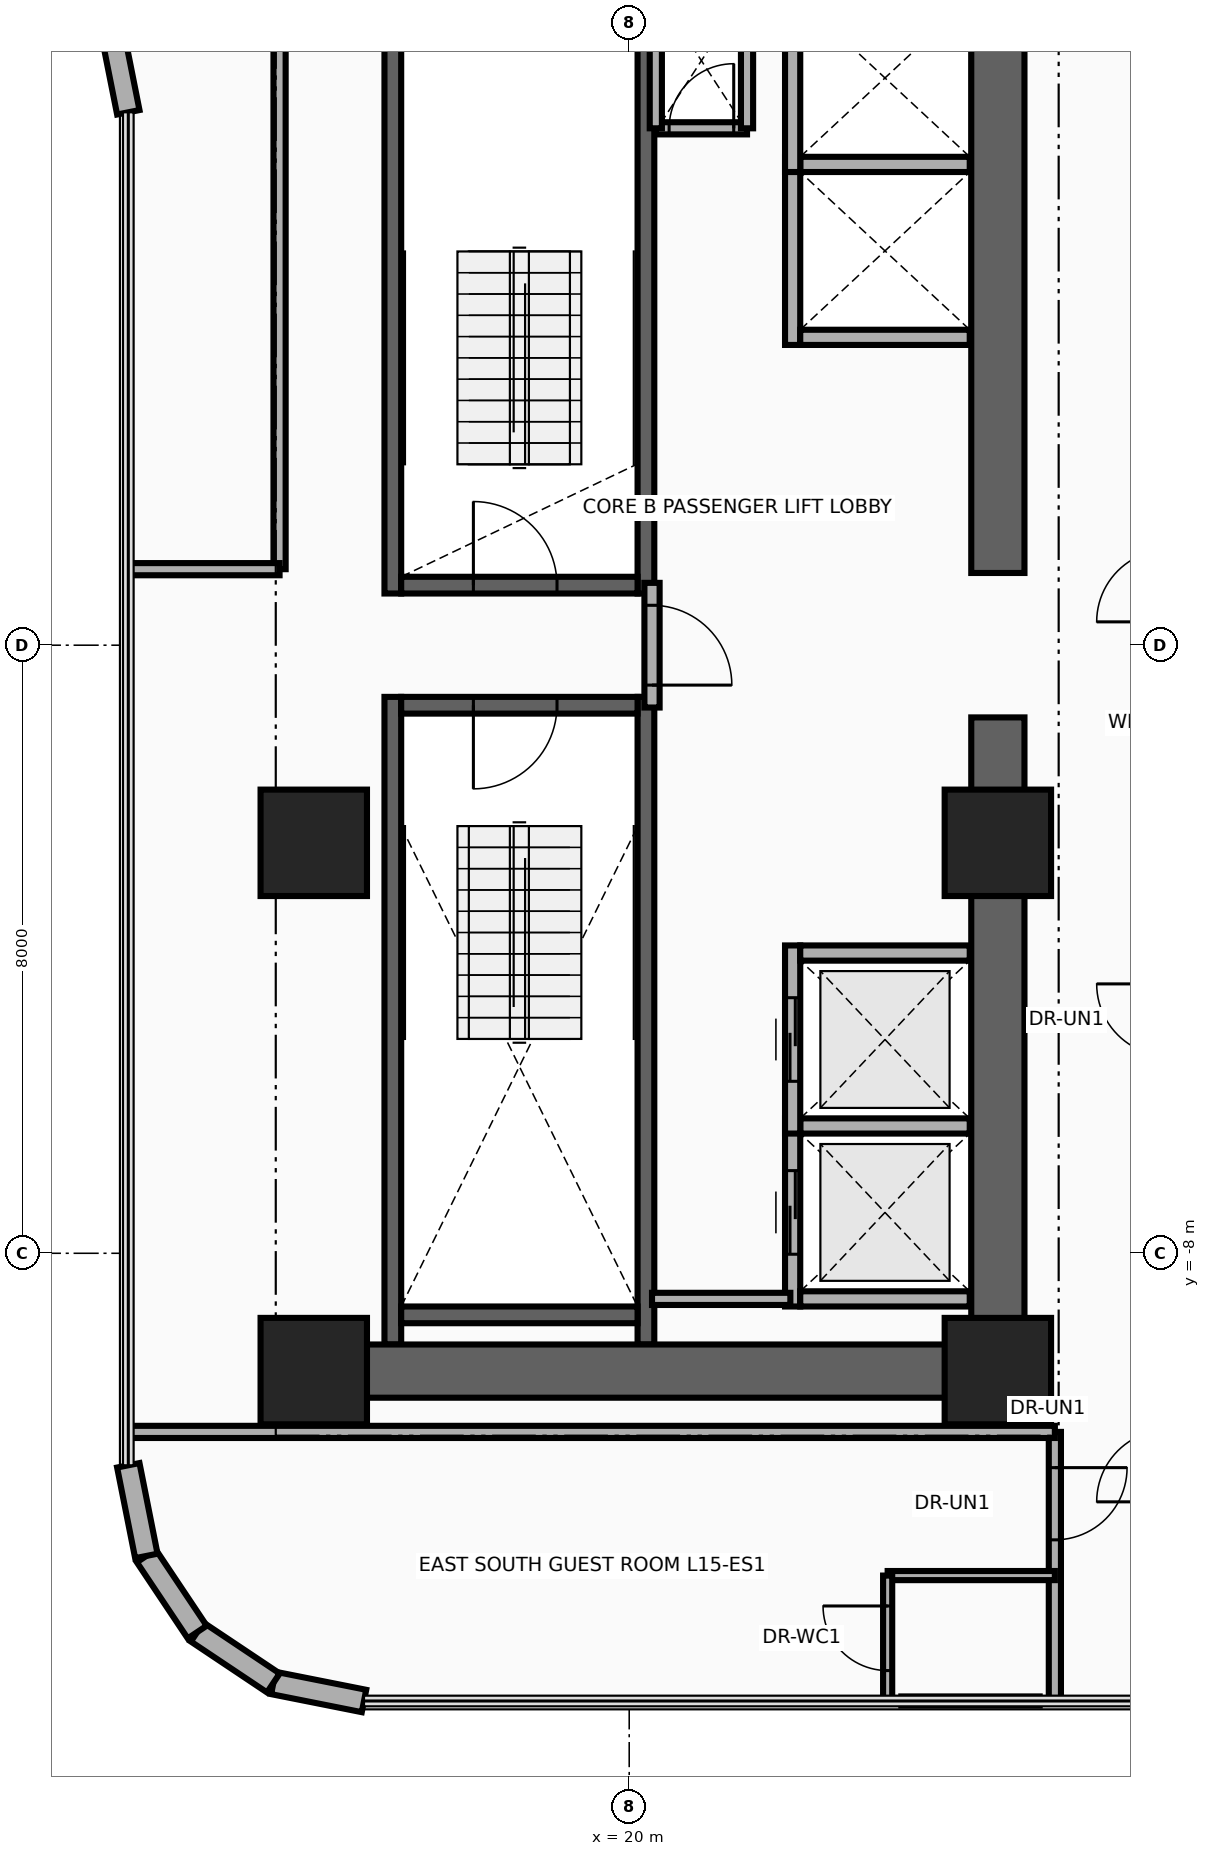
"""IFC4 building model, lengths in metres.
Left out: names, types, materials, properties, quantities, classifications, styles, units other than length and angle.
Written with IfcOpenShell. Run it as: python <this file> out.ifc"""

import sys

from ifc_helpers import new_model, si_unit, direction, frame, frame_2d, origin, origin_2d, place, context, subcontext, project, spatial, rectangle, extrude, source, transform, mapped, element, fill, save


model = new_model("IFC4")
c1 = context("Model", 3, precision=1e-05, world=origin(), true_north=direction((0.0, 1.0)))
c2 = subcontext(c1, "Body", "Model", "MODEL_VIEW")
j1 = project(units=[si_unit("LENGTHUNIT", "METRE"), si_unit("PLANEANGLEUNIT", "RADIAN")], contexts=[c1])
p1 = place(None, origin())
s1 = spatial("IfcSite", under=j1, at=p1, CompositionType="ELEMENT")
p2 = place(p1, origin())
s2 = spatial("IfcBuilding", under=s1, at=p2, CompositionType="ELEMENT")
p3 = place(p2, frame((0.0, 0.0, 63.0)))
s3 = spatial("IfcBuildingStorey", under=s2, at=p3, CompositionType="ELEMENT", Elevation=63.0)
for number, where, z_axis, x_axis in (
    (1, (16.89, 0.68, 0.0), (0.0, 0.0, 1.0), (0.0, 1.0, 0.0)),
    (2, (20.22, 0.68, 0.0), (0.0, 0.0, 1.0), (0.0, 1.0, 0.0)),
):
    element("IfcWall", number, at=place(p3, frame(where, z_axis=z_axis, x_axis=x_axis)), inside=s3, PredefinedType="SHEAR", context=c2, shape_type="SweptSolid", body=[
        extrude(rectangle(XDim=8.52, YDim=0.22, at=frame_2d((4.26, 0.0))), origin(), (0.0, 0.0, 1.0), 3.46),
    ])
p4 = place(p3, frame((17.0, 0.79, 0.0), z_axis=(0.0, 0.0, 1.0), x_axis=(1.0, 0.0, 0.0)))
e3 = element("IfcWall", 3, at=p4, inside=s3, PredefinedType="SHEAR", context=c2, shape_type="SweptSolid", body=[
    extrude(rectangle(XDim=3.11, YDim=0.22, at=frame_2d((1.555, 0.0))), origin(), (0.0, 0.0, 1.0), 3.46),
])
p5 = place(p4, frame((0.95, 0.0, 0.0)))
e4 = element("IfcOpeningElement", 4, at=p5, cuts=e3, PredefinedType="OPENING", context=c2, shape_type="SweptSolid", body=[
    extrude(rectangle(XDim=1.1, YDim=2.15, at=frame_2d((0.55, 1.075))), frame((0.0, 0.125, 0.0), z_axis=(0.0, -1.0, 0.0), x_axis=(1.0, 0.0, 0.0)), (0.0, 0.0, 1.0), 0.25),
])
for number, where, z_axis, x_axis in (
    (5, (16.89, -9.2, 0.0), (0.0, 0.0, 1.0), (0.0, 1.0, 0.0)),
    (6, (20.22, -9.2, 0.0), (0.0, 0.0, 1.0), (0.0, 1.0, 0.0)),
):
    element("IfcWall", number, at=place(p3, frame(where, z_axis=z_axis, x_axis=x_axis)), inside=s3, PredefinedType="SHEAR", context=c2, shape_type="SweptSolid", body=[
        extrude(rectangle(XDim=8.52, YDim=0.22, at=frame_2d((4.26, 0.0))), origin(), (0.0, 0.0, 1.0), 3.46),
    ])
p6 = place(p3, frame((17.0, -8.81, 0.0), z_axis=(0.0, 0.0, 1.0), x_axis=(1.0, 0.0, 0.0)))
e7 = element("IfcWall", 7, at=p6, inside=s3, PredefinedType="SHEAR", context=c2, shape_type="SweptSolid", body=[
    extrude(rectangle(XDim=3.11, YDim=0.22, at=frame_2d((1.555, 0.0))), origin(), (0.0, 0.0, 1.0), 3.46),
])
p7 = place(p3, frame((17.0, -0.79, 0.0), z_axis=(0.0, 0.0, 1.0), x_axis=(1.0, 0.0, 0.0)))
e8 = element("IfcWall", 8, at=p7, inside=s3, PredefinedType="SHEAR", context=c2, shape_type="SweptSolid", body=[
    extrude(rectangle(XDim=3.11, YDim=0.22, at=frame_2d((1.555, 0.0))), origin(), (0.0, 0.0, 1.0), 3.46),
])
p8 = place(p7, frame((0.95, 0.0, 0.0)))
e9 = element("IfcOpeningElement", 9, at=p8, cuts=e8, PredefinedType="OPENING", context=c2, shape_type="SweptSolid", body=[
    extrude(rectangle(XDim=1.1, YDim=2.15, at=frame_2d((0.55, 1.075))), frame((0.0, 0.125, 0.0), z_axis=(0.0, -1.0, 0.0), x_axis=(1.0, 0.0, 0.0)), (0.0, 0.0, 1.0), 0.25),
])
for number, where, z_axis, x_axis in (
    (10, (24.85, -9.9, 0.0), (0.0, 0.0, 1.0), (0.0, 1.0, 0.0)),
    (11, (24.85, 0.95, 0.0), (0.0, 0.0, 1.0), (0.0, 1.0, 0.0)),
):
    element("IfcWall", number, at=place(p3, frame(where, z_axis=z_axis, x_axis=x_axis)), inside=s3, PredefinedType="SHEAR", context=c2, shape_type="SweptSolid", body=[
        extrude(rectangle(XDim=8.95, YDim=0.7, at=frame_2d((4.475, 0.0))), origin(), (0.0, 0.0, 1.0), 3.46),
    ])
p9 = place(p3, frame((15.85, -9.55, 0.0), z_axis=(0.0, 0.0, 1.0), x_axis=(1.0, 0.0, 0.0)))
e12 = element("IfcWall", 12, at=p9, inside=s3, PredefinedType="SHEAR", context=c2, shape_type="SweptSolid", body=[
    extrude(rectangle(XDim=9.0, YDim=0.7, at=frame_2d((4.5, 0.0))), origin(), (0.0, 0.0, 1.0), 3.46),
])
m1 = source(origin(), c2, "Body", "SweptSolid", [
    extrude(rectangle(XDim=1.4, YDim=1.4, at=origin_2d()), origin(), (0.0, 0.0, 1.0), 3.7),
])
for number, where, z_axis, x_axis in (
    (13, (15.85, -9.55, 0.0), (0.0, 0.0, 1.0), (1.0, 0.0, 0.0)),
    (14, (24.85, -9.55, 0.0), (0.0, 0.0, 1.0), (1.0, 0.0, 0.0)),
    (15, (15.85, -2.6, 0.0), (0.0, 0.0, 1.0), (1.0, 0.0, 0.0)),
    (16, (24.85, -2.6, 0.0), (0.0, 0.0, 1.0), (1.0, 0.0, 0.0)),
):
    element("IfcColumn", number, at=place(p3, frame(where, z_axis=z_axis, x_axis=x_axis)), inside=s3, PredefinedType="COLUMN", context=c2, shape_type="MappedRepresentation", body=[
        mapped(m1, transform((0.0, 0.0, 0.0), x_axis=(1.0, 0.0, 0.0), y_axis=(0.0, 1.0, 0.0), z_axis=(0.0, 0.0, 1.0), scale=1.0)),
    ])
p10 = place(p3, frame((16.511, -13.89, 0.0), z_axis=(0.0, 0.0, 1.0), x_axis=(-0.980804027463, 0.194996050505, 0.0)))
e17 = element("IfcWall", 17, at=p10, inside=s3, PredefinedType="SOLIDWALL", context=c2, shape_type="SweptSolid", body=[
    extrude(rectangle(XDim=1.216, YDim=0.3, at=frame_2d((0.608, 0.0))), origin(), (0.0, 0.0, 1.0), 3.46),
])
for number, where, z_axis, x_axis in (
    (18, (15.318, -13.653, 0.0), (0.0, 0.0, 1.0), (-0.831, 0.556, 0.0)),
    (19, (14.317, -12.983, 0.0), (0.0, 0.0, 1.0), (-0.556, 0.831, 0.0)),
):
    element("IfcWall", number, at=place(p3, frame(where, z_axis=z_axis, x_axis=x_axis)), inside=s3, PredefinedType="SOLIDWALL", context=c2, shape_type="SweptSolid", body=[
        extrude(rectangle(XDim=1.205, YDim=0.3, at=frame_2d((0.603, 0.0))), origin(), (0.0, 0.0, 1.0), 3.46),
    ])
p11 = place(p3, frame((13.647, -11.982, 0.0), z_axis=(0.0, 0.0, 1.0), x_axis=(-0.195189223115, 0.980765602568, 0.0)))
e20 = element("IfcWall", 20, at=p11, inside=s3, PredefinedType="SOLIDWALL", context=c2, shape_type="SweptSolid", body=[
    extrude(rectangle(XDim=1.216, YDim=0.3, at=frame_2d((0.608, 0.0))), origin(), (0.0, 0.0, 1.0), 3.46),
])
p12 = place(p3, frame((13.41, 7.011, 0.0), z_axis=(0.0, 0.0, 1.0), x_axis=(-0.195090163074, 0.980785312019, 0.0)))
e21 = element("IfcWall", 21, at=p12, inside=s3, PredefinedType="SOLIDWALL", context=c2, shape_type="SweptSolid", body=[
    extrude(rectangle(XDim=1.281, YDim=0.3, at=frame_2d((0.641, 0.0))), origin(), (0.0, 0.0, 1.0), 3.46),
])
p13 = place(p3, frame((22.15, -8.7, 0.0), z_axis=(0.0, 0.0, 1.0), x_axis=(0.0, 1.0, 0.0)))
e22 = element("IfcWall", 22, at=p13, inside=s3, PredefinedType="MOVABLE", context=c2, shape_type="SweptSolid", body=[
    extrude(rectangle(XDim=2.475, YDim=0.2, at=frame_2d((1.237, 0.0))), origin(), (0.0, 0.0, 1.0), 3.46),
])
p14 = place(p13, frame((0.688, 0.0, 0.0)))
e23 = element("IfcOpeningElement", 23, at=p14, cuts=e22, PredefinedType="OPENING", context=c2, shape_type="SweptSolid", body=[
    extrude(rectangle(XDim=1.1, YDim=2.1, at=frame_2d((0.55, 1.05))), frame((0.0, 0.115, 0.0), z_axis=(0.0, -1.0, 0.0), x_axis=(1.0, 0.0, 0.0)), (0.0, 0.0, 1.0), 0.23),
])
for number, where, z_axis, x_axis in (
    (24, (22.25, -8.6, 0.0), (0.0, 0.0, 1.0), (1.0, 0.0, 0.0)),
    (25, (22.25, -6.325, 0.0), (0.0, 0.0, 1.0), (1.0, 0.0, 0.0)),
):
    element("IfcWall", number, at=place(p3, frame(where, z_axis=z_axis, x_axis=x_axis)), inside=s3, PredefinedType="MOVABLE", context=c2, shape_type="SweptSolid", body=[
        extrude(rectangle(XDim=2.23, YDim=0.2, at=frame_2d((1.115, 0.0))), origin(), (0.0, 0.0, 1.0), 3.46),
    ])
p15 = place(p3, frame((22.15, -6.425, 0.0), z_axis=(0.0, 0.0, 1.0), x_axis=(0.0, 1.0, 0.0)))
e26 = element("IfcWall", 26, at=p15, inside=s3, PredefinedType="MOVABLE", context=c2, shape_type="SweptSolid", body=[
    extrude(rectangle(XDim=2.475, YDim=0.2, at=frame_2d((1.238, 0.0))), origin(), (0.0, 0.0, 1.0), 3.46),
])
p16 = place(p15, frame((0.688, 0.0, 0.0)))
e27 = element("IfcOpeningElement", 27, at=p16, cuts=e26, PredefinedType="OPENING", context=c2, shape_type="SweptSolid", body=[
    extrude(rectangle(XDim=1.1, YDim=2.1, at=frame_2d((0.55, 1.05))), frame((0.0, 0.115, 0.0), z_axis=(0.0, -1.0, 0.0), x_axis=(1.0, 0.0, 0.0)), (0.0, 0.0, 1.0), 0.23),
])
p17 = place(p3, frame((22.25, -4.05, 0.0), z_axis=(0.0, 0.0, 1.0), x_axis=(1.0, 0.0, 0.0)))
e28 = element("IfcWall", 28, at=p17, inside=s3, PredefinedType="MOVABLE", context=c2, shape_type="SweptSolid", body=[
    extrude(rectangle(XDim=2.23, YDim=0.2, at=frame_2d((1.115, 0.0))), origin(), (0.0, 0.0, 1.0), 3.46),
])
p18 = place(p3, frame((22.15, 3.95, 0.0), z_axis=(0.0, 0.0, 1.0), x_axis=(0.0, 1.0, 0.0)))
e29 = element("IfcWall", 29, at=p18, inside=s3, PredefinedType="MOVABLE", context=c2, shape_type="SweptSolid", body=[
    extrude(rectangle(XDim=2.475, YDim=0.2, at=frame_2d((1.238, 0.0))), origin(), (0.0, 0.0, 1.0), 3.46),
])
for number, where, z_axis, x_axis in (
    (30, (22.25, 4.05, 0.0), (0.0, 0.0, 1.0), (1.0, 0.0, 0.0)),
    (31, (22.25, 6.325, 0.0), (0.0, 0.0, 1.0), (1.0, 0.0, 0.0)),
):
    element("IfcWall", number, at=place(p3, frame(where, z_axis=z_axis, x_axis=x_axis)), inside=s3, PredefinedType="MOVABLE", context=c2, shape_type="SweptSolid", body=[
        extrude(rectangle(XDim=2.23, YDim=0.2, at=frame_2d((1.115, 0.0))), origin(), (0.0, 0.0, 1.0), 2.245),
    ])
p19 = place(p3, frame((22.15, 6.225, 0.0), z_axis=(0.0, 0.0, 1.0), x_axis=(0.0, 1.0, 0.0)))
e32 = element("IfcWall", 32, at=p19, inside=s3, PredefinedType="MOVABLE", context=c2, shape_type="SweptSolid", body=[
    extrude(rectangle(XDim=2.475, YDim=0.2, at=frame_2d((1.237, 0.0))), origin(), (0.0, 0.0, 1.0), 3.46),
])
p20 = place(p3, frame((20.3, -0.82, 0.0), z_axis=(0.0, 0.0, 1.0), x_axis=(0.0, 1.0, 0.0)))
e33 = element("IfcWall", 33, at=p20, inside=s3, PredefinedType="PARTITIONING", context=c2, shape_type="SweptSolid", body=[
    extrude(rectangle(XDim=1.64, YDim=0.2, at=frame_2d((0.82, 0.0))), origin(), (0.0, 0.0, 1.0), 3.46),
])
p21 = place(p20, frame((0.295, 0.0, 0.0)))
e34 = element("IfcOpeningElement", 34, at=p21, cuts=e33, PredefinedType="OPENING", context=c2, shape_type="SweptSolid", body=[
    extrude(rectangle(XDim=1.05, YDim=2.15, at=frame_2d((0.525, 1.075))), frame((0.0, 0.115, 0.0), z_axis=(0.0, -1.0, 0.0), x_axis=(1.0, 0.0, 0.0)), (0.0, 0.0, 1.0), 0.23),
])
p22 = place(p3, frame((20.35, 6.8, 0.0), z_axis=(0.0, 0.0, 1.0), x_axis=(1.0, 0.0, 0.0)))
e35 = element("IfcWall", 35, at=p22, inside=s3, PredefinedType="PARTITIONING", context=c2, shape_type="SweptSolid", body=[
    extrude(rectangle(XDim=1.2, YDim=0.16, at=frame_2d((0.6, 0.0))), origin(), (0.0, 0.0, 1.0), 3.46),
])
p23 = place(p22, frame((0.175, 0.0, 0.0)))
e36 = element("IfcOpeningElement", 36, at=p23, cuts=e35, PredefinedType="OPENING", context=c2, shape_type="SweptSolid", body=[
    extrude(rectangle(XDim=0.85, YDim=2.05, at=frame_2d((0.425, 1.025))), frame((0.0, 0.095, 0.0), z_axis=(0.0, -1.0, 0.0), x_axis=(1.0, 0.0, 0.0)), (0.0, 0.0, 1.0), 0.19),
])
for number, where, z_axis, x_axis in (
    (37, (21.55, 6.8, 0.0), (0.0, 0.0, 1.0), (0.0, 1.0, 0.0)),
    (38, (20.35, 6.8, 0.0), (0.0, 0.0, 1.0), (0.0, 1.0, 0.0)),
):
    element("IfcWall", number, at=place(p3, frame(where, z_axis=z_axis, x_axis=x_axis)), inside=s3, PredefinedType="PARTITIONING", context=c2, shape_type="SweptSolid", body=[
        extrude(rectangle(XDim=1.8, YDim=0.16, at=frame_2d((0.9, 0.0))), origin(), (0.0, 0.0, 1.0), 3.46),
    ])
p24 = place(p3, frame((20.3, -8.6, 0.0), z_axis=(0.0, 0.0, 1.0), x_axis=(1.0, 0.0, 0.0)))
e39 = element("IfcWall", 39, at=p24, inside=s3, PredefinedType="PARTITIONING", context=c2, shape_type="SweptSolid", body=[
    extrude(rectangle(XDim=1.82, YDim=0.16, at=frame_2d((0.91, 0.0))), origin(), (0.0, 0.0, 1.0), 3.46),
])
p25 = place(p3, frame((25.6, -13.89, 0.0), z_axis=(0.0, 0.0, 1.0), x_axis=(0.0, 1.0, 0.0)))
e40 = element("IfcWall", 40, at=p25, inside=s3, PredefinedType="PARTITIONING", context=c2, shape_type="SweptSolid", body=[
    extrude(rectangle(XDim=3.54, YDim=0.16, at=frame_2d((1.77, 0.0))), origin(), (0.0, 0.0, 1.0), 3.46),
])
p26 = place(p25, frame((2.12, 0.0, 0.0)))
e41 = element("IfcOpeningElement", 41, at=p26, cuts=e40, PredefinedType="OPENING", context=c2, shape_type="SweptSolid", body=[
    extrude(rectangle(XDim=0.95, YDim=2.15, at=frame_2d((0.475, 1.075))), frame((0.0, 0.095, 0.0), z_axis=(0.0, -1.0, 0.0), x_axis=(1.0, 0.0, 0.0)), (0.0, 0.0, 1.0), 0.19),
])
p27 = place(p3, frame((13.41, -10.35, 0.0), z_axis=(0.0, 0.0, 1.0), x_axis=(1.0, 0.0, 0.0)))
e42 = element("IfcWall", 42, at=p27, inside=s3, PredefinedType="PARTITIONING", context=c2, shape_type="SweptSolid", body=[
    extrude(rectangle(XDim=12.19, YDim=0.16, at=frame_2d((6.095, 0.0))), origin(), (0.0, 0.0, 1.0), 3.46),
])
p28 = place(p3, frame((23.4, -12.24, 0.0), z_axis=(0.0, 0.0, 1.0), x_axis=(1.0, 0.0, 0.0)))
e43 = element("IfcWall", 43, at=p28, inside=s3, PredefinedType="PARTITIONING", context=c2, shape_type="SweptSolid", body=[
    extrude(rectangle(XDim=2.2, YDim=0.12, at=frame_2d((1.1, 0.0))), origin(), (0.0, 0.0, 1.0), 3.46),
])
p29 = place(p3, frame((23.4, -13.89, 0.0), z_axis=(0.0, 0.0, 1.0), x_axis=(0.0, 1.0, 0.0)))
e44 = element("IfcWall", 44, at=p29, inside=s3, PredefinedType="PARTITIONING", context=c2, shape_type="SweptSolid", body=[
    extrude(rectangle(XDim=1.65, YDim=0.12, at=frame_2d((0.825, 0.0))), origin(), (0.0, 0.0, 1.0), 3.46),
])
p30 = place(p29, frame((0.4, 0.0, 0.0)))
e45 = element("IfcOpeningElement", 45, at=p30, cuts=e44, PredefinedType="OPENING", context=c2, shape_type="SweptSolid", body=[
    extrude(rectangle(XDim=0.85, YDim=2.1, at=frame_2d((0.425, 1.05))), frame((0.0, 0.075, 0.0), z_axis=(0.0, -1.0, 0.0), x_axis=(1.0, 0.0, 0.0)), (0.0, 0.0, 1.0), 0.15),
])
p31 = place(p3, frame((23.58, -13.89, 0.0), z_axis=(0.0, 0.0, 1.0), x_axis=(1.0, 0.0, 0.0)))
e46 = element("IfcWall", 46, at=p31, inside=s3, PredefinedType="PARTITIONING", context=c2, shape_type="SweptSolid", body=[
    extrude(rectangle(XDim=1.82, YDim=0.12, at=frame_2d((0.91, 0.0))), origin(), (0.0, 0.0, 1.0), 3.46),
])
p32 = place(p3, frame((15.4, 1.0, 0.0), z_axis=(0.0, 0.0, 1.0), x_axis=(0.0, 1.0, 0.0)))
e47 = element("IfcWall", 47, at=p32, inside=s3, PredefinedType="PARTITIONING", context=c2, shape_type="SweptSolid", body=[
    extrude(rectangle(XDim=9.35, YDim=0.16, at=frame_2d((4.675, 0.0))), origin(), (0.0, 0.0, 1.0), 2.245),
])
p33 = place(p3, frame((13.41, 1.0, 0.0), z_axis=(0.0, 0.0, 1.0), x_axis=(1.0, 0.0, 0.0)))
e48 = element("IfcWall", 48, at=p33, inside=s3, PredefinedType="PARTITIONING", context=c2, shape_type="SweptSolid", body=[
    extrude(rectangle(XDim=1.99, YDim=0.16, at=frame_2d((0.995, 0.0))), origin(), (0.0, 0.0, 1.0), 2.245),
])
p34 = place(p14, origin())
e49 = element("IfcDoor", 49, at=p34, inside=s3, OperationType="DOUBLE_DOOR_SLIDING", PredefinedType="DOOR", context=c2, shape_type="SweptSolid", body=[
    extrude(rectangle(XDim=1.1, YDim=2.1, at=frame_2d((0.55, 1.05))), frame((0.0, 0.025, 0.0), z_axis=(0.0, -1.0, 0.0), x_axis=(1.0, 0.0, 0.0)), (0.0, 0.0, 1.0), 0.05),
])
fill(e23, e49)
p35 = place(p16, origin())
e50 = element("IfcDoor", 50, at=p35, inside=s3, OperationType="DOUBLE_DOOR_SLIDING", PredefinedType="DOOR", context=c2, shape_type="SweptSolid", body=[
    extrude(rectangle(XDim=1.1, YDim=2.1, at=frame_2d((0.55, 1.05))), frame((0.0, 0.025, 0.0), z_axis=(0.0, -1.0, 0.0), x_axis=(1.0, 0.0, 0.0)), (0.0, 0.0, 1.0), 0.05),
])
fill(e27, e50)
p36 = place(p21, frame((1.05, 0.0, 0.0), z_axis=(0.0, 0.0, 1.0), x_axis=(-1.0, 0.0, 0.0)))
e51 = element("IfcDoor", 51, at=p36, inside=s3, OperationType="SINGLE_SWING_LEFT", PredefinedType="DOOR", context=c2, shape_type="SweptSolid", body=[
    extrude(rectangle(XDim=1.05, YDim=2.15, at=frame_2d((0.525, 1.075))), frame((0.0, 0.025, 0.0), z_axis=(0.0, -1.0, 0.0), x_axis=(1.0, 0.0, 0.0)), (0.0, 0.0, 1.0), 0.05),
])
fill(e34, e51)
p37 = place(p5, origin())
e52 = element("IfcDoor", 52, at=p37, inside=s3, OperationType="SINGLE_SWING_RIGHT", PredefinedType="DOOR", context=c2, shape_type="SweptSolid", body=[
    extrude(rectangle(XDim=1.1, YDim=2.15, at=frame_2d((0.55, 1.075))), frame((0.0, 0.025, 0.0), z_axis=(0.0, -1.0, 0.0), x_axis=(1.0, 0.0, 0.0)), (0.0, 0.0, 1.0), 0.05),
])
fill(e4, e52)
p38 = place(p8, frame((1.1, 0.0, 0.0), z_axis=(0.0, 0.0, 1.0), x_axis=(-1.0, 0.0, 0.0)))
e53 = element("IfcDoor", 53, at=p38, inside=s3, OperationType="SINGLE_SWING_LEFT", PredefinedType="DOOR", context=c2, shape_type="SweptSolid", body=[
    extrude(rectangle(XDim=1.1, YDim=2.15, at=frame_2d((0.55, 1.075))), frame((0.0, 0.025, 0.0), z_axis=(0.0, -1.0, 0.0), x_axis=(1.0, 0.0, 0.0)), (0.0, 0.0, 1.0), 0.05),
])
fill(e9, e53)
p39 = place(p23, origin())
e54 = element("IfcDoor", 54, at=p39, inside=s3, OperationType="SINGLE_SWING_RIGHT", PredefinedType="DOOR", context=c2, shape_type="SweptSolid", body=[
    extrude(rectangle(XDim=0.85, YDim=2.05, at=frame_2d((0.425, 1.025))), frame((0.0, 0.025, 0.0), z_axis=(0.0, -1.0, 0.0), x_axis=(1.0, 0.0, 0.0)), (0.0, 0.0, 1.0), 0.05),
])
fill(e36, e54)
p40 = place(p26, frame((0.95, 0.0, 0.0), z_axis=(0.0, 0.0, 1.0), x_axis=(-1.0, 0.0, 0.0)))
e55 = element("IfcDoor", 55, at=p40, inside=s3, OperationType="SINGLE_SWING_LEFT", PredefinedType="DOOR", context=c2, shape_type="SweptSolid", body=[
    extrude(rectangle(XDim=0.95, YDim=2.15, at=frame_2d((0.475, 1.075))), frame((0.0, 0.025, 0.0), z_axis=(0.0, -1.0, 0.0), x_axis=(1.0, 0.0, 0.0)), (0.0, 0.0, 1.0), 0.05),
])
fill(e41, e55)
p41 = place(p30, origin())
e56 = element("IfcDoor", 56, at=p41, inside=s3, OperationType="SINGLE_SWING_RIGHT", PredefinedType="DOOR", context=c2, shape_type="SweptSolid", body=[
    extrude(rectangle(XDim=0.85, YDim=2.1, at=frame_2d((0.425, 1.05))), frame((0.0, 0.025, 0.0), z_axis=(0.0, -1.0, 0.0), x_axis=(1.0, 0.0, 0.0)), (0.0, 0.0, 1.0), 0.05),
])
fill(e45, e56)
save(model, sys.argv[1])
